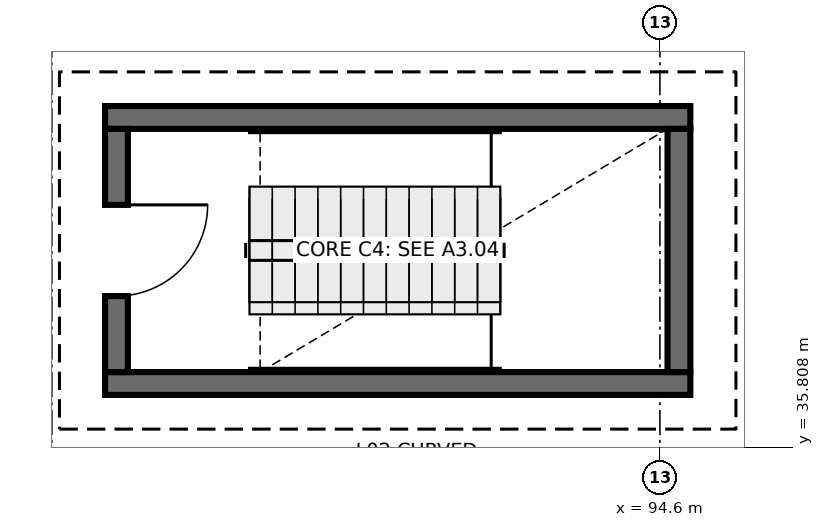
"""IFC4 building model, lengths in metres.
Left out: names, types, materials, properties, quantities, classifications, styles, units other than length and angle.
Written with IfcOpenShell. Run it as: python <this file> out.ifc"""

import sys

from ifc_helpers import new_model, si_unit, direction, frame, frame_2d, origin, place, context, subcontext, project, spatial, rectangle, extrude, element, fill, save


model = new_model("IFC4")
c1 = context("Model", 3, precision=1e-05, world=origin(), true_north=direction((0.0, 1.0)))
c2 = subcontext(c1, "Body", "Model", "MODEL_VIEW")
j1 = project(units=[si_unit("LENGTHUNIT", "METRE"), si_unit("PLANEANGLEUNIT", "RADIAN")], contexts=[c1])
p1 = place(None, origin())
s1 = spatial("IfcSite", under=j1, at=p1, CompositionType="ELEMENT")
p2 = place(p1, origin())
s2 = spatial("IfcBuilding", under=s1, at=p2, CompositionType="ELEMENT")
p3 = place(p2, frame((0.0, 0.0, 9.3)))
s3 = spatial("IfcBuildingStorey", under=s2, at=p3, CompositionType="ELEMENT", Elevation=9.3)
for number, where, z_axis, x_axis in (
    (1, (87.3, 36.65, 0.0), (0.0, 0.0, 1.0), (1.0, 0.0, 0.0)),
    (2, (95.0, 40.15, 0.0), (0.0, 0.0, 1.0), (-1.0, 0.0, 0.0)),
):
    element("IfcWall", number, at=place(p3, frame(where, z_axis=z_axis, x_axis=x_axis)), inside=s3, PredefinedType="SHEAR", context=c2, shape_type="SweptSolid", body=[
        extrude(rectangle(XDim=7.7, YDim=0.3, at=frame_2d((3.85, 0.0))), origin(), (0.0, 0.0, 1.0), 4.5),
    ])
p4 = place(p3, frame((87.45, 40.0, 0.0), z_axis=(0.0, 0.0, 1.0), x_axis=(0.0, -1.0, 0.0)))
e3 = element("IfcWall", 3, at=p4, inside=s3, PredefinedType="SHEAR", context=c2, shape_type="SweptSolid", body=[
    extrude(rectangle(XDim=3.2, YDim=0.3, at=frame_2d((1.6, 0.0))), origin(), (0.0, 0.0, 1.0), 4.5),
])
p5 = place(p4, frame((1.0, 0.0, 0.0)))
e4 = element("IfcOpeningElement", 4, at=p5, cuts=e3, PredefinedType="OPENING", context=c2, shape_type="SweptSolid", body=[
    extrude(rectangle(XDim=1.2, YDim=2.15, at=frame_2d((0.6, 1.075))), frame((0.0, 0.16, 0.0), z_axis=(0.0, -1.0, 0.0), x_axis=(1.0, 0.0, 0.0)), (0.0, 0.0, 1.0), 0.32),
])
p6 = place(p3, frame((94.85, 36.8, 0.0), z_axis=(0.0, 0.0, 1.0), x_axis=(0.0, 1.0, 0.0)))
e5 = element("IfcWall", 5, at=p6, inside=s3, PredefinedType="SHEAR", context=c2, shape_type="SweptSolid", body=[
    extrude(rectangle(XDim=3.2, YDim=0.3, at=frame_2d((1.6, 0.0))), origin(), (0.0, 0.0, 1.0), 4.5),
])
p7 = place(p5, origin())
e6 = element("IfcDoor", 6, at=p7, inside=s3, OperationType="SINGLE_SWING_LEFT", PredefinedType="DOOR", context=c2, shape_type="SweptSolid", body=[
    extrude(rectangle(XDim=1.2, YDim=2.15, at=frame_2d((0.6, 1.075))), frame((0.0, 0.025, 0.0), z_axis=(0.0, -1.0, 0.0), x_axis=(1.0, 0.0, 0.0)), (0.0, 0.0, 1.0), 0.05),
])
fill(e4, e6)
save(model, sys.argv[1])
